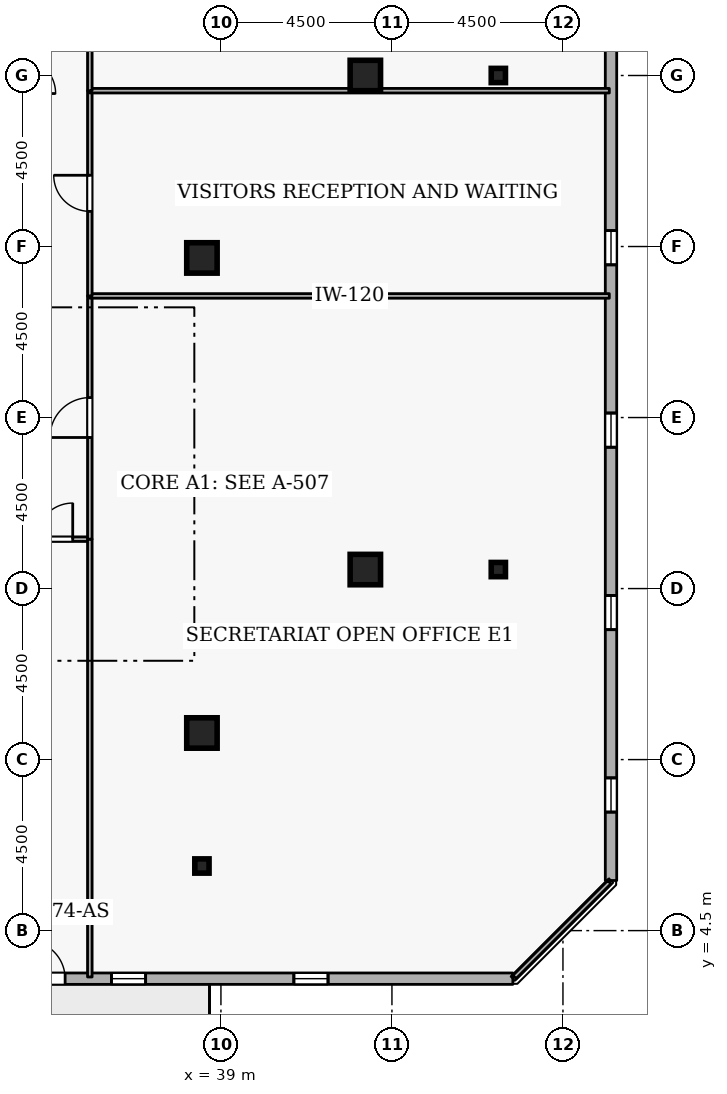
"""IFC4 building model, lengths in metres.
Left out: names, types, materials, properties, quantities, classifications, styles, units other than length and angle.
Written with IfcOpenShell. Run it as: python <this file> out.ifc"""

import sys

from ifc_helpers import new_model, si_unit, direction, frame, frame_2d, origin, origin_2d, place, context, subcontext, project, spatial, rectangle, i_section, extrude, element, fill, save


model = new_model("IFC4")
c1 = context("Model", 3, precision=1e-05, world=origin(), true_north=direction((0.0, 1.0)))
c2 = subcontext(c1, "Body", "Model", "MODEL_VIEW")
j1 = project(units=[si_unit("LENGTHUNIT", "METRE"), si_unit("PLANEANGLEUNIT", "RADIAN")], contexts=[c1])
p1 = place(None, origin())
s1 = spatial("IfcSite", under=j1, at=p1, CompositionType="ELEMENT")
p2 = place(p1, origin())
s2 = spatial("IfcBuilding", under=s1, at=p2, CompositionType="ELEMENT")
p3 = place(p2, frame((0.0, 0.0, 276.3)))
s3 = spatial("IfcBuildingStorey", under=s2, at=p3, CompositionType="ELEMENT", Elevation=276.3)
for number, where, z_axis, x_axis in (
    (1, (38.5, 9.7, 0.0), (0.0, 0.0, 1.0), (1.0, 0.0, 0.0)),
    (2, (42.8, 14.0, 0.0), (0.0, 0.0, 1.0), (1.0, 0.0, 0.0)),
    (3, (42.8, 27.0, 0.0), (0.0, 0.0, 1.0), (1.0, 0.0, 0.0)),
    (4, (38.5, 22.2, 0.0), (0.0, 0.0, 1.0), (1.0, 0.0, 0.0)),
):
    element("IfcColumn", number, at=place(p3, frame(where, z_axis=z_axis, x_axis=x_axis)), inside=s3, PredefinedType="COLUMN", context=c2, shape_type="SweptSolid", body=[
        extrude(rectangle(XDim=0.8, YDim=0.8, at=origin_2d()), origin(), (0.0, 0.0, 1.0), 3.6),
    ])
for number, where, z_axis, x_axis in (
    (5, (38.5, 6.2, 0.0), (0.0, 0.0, 1.0), (1.0, 0.0, 0.0)),
    (6, (46.3, 14.0, 0.0), (0.0, 0.0, 1.0), (1.0, 0.0, 0.0)),
    (7, (46.3, 27.0, 0.0), (0.0, 0.0, 1.0), (1.0, 0.0, 0.0)),
):
    element("IfcColumn", number, at=place(p3, frame(where, z_axis=z_axis, x_axis=x_axis)), inside=s3, PredefinedType="COLUMN", context=c2, shape_type="SweptSolid", body=[
        extrude(i_section(OverallWidth=0.375, OverallDepth=0.375, WebThickness=0.017, FlangeThickness=0.027, FilletRadius=0.015, at=origin_2d()), origin(), (0.0, 0.0, 1.0), 3.6),
    ])
p4 = place(p3, frame((10.319, 3.235, 0.0), z_axis=(0.0, 0.0, 1.0), x_axis=(1.0, 0.0, 0.0)))
e8 = element("IfcWall", 8, at=p4, inside=s3, PredefinedType="STANDARD", context=c2, shape_type="SweptSolid", body=[
    extrude(rectangle(XDim=36.363, YDim=0.3, at=frame_2d((18.181, 0.0))), origin(), (0.0, 0.0, 1.0), 2.66),
])
p5 = place(p4, frame((23.581, 0.0, 0.0)))
e9 = element("IfcOpeningElement", 9, at=p5, cuts=e8, PredefinedType="OPENING", context=c2, shape_type="SweptSolid", body=[
    extrude(rectangle(XDim=1.0, YDim=2.08, at=frame_2d((0.5, 1.04))), frame((0.0, 0.16, 0.0), z_axis=(0.0, -1.0, 0.0), x_axis=(1.0, 0.0, 0.0)), (0.0, 0.0, 1.0), 0.32),
])
p6 = place(p4, frame((1.8, 0.0, 0.72)))
e10 = element("IfcOpeningElement", 10, at=p6, cuts=e8, PredefinedType="OPENING", context=c2, shape_type="SweptSolid", body=[
    extrude(rectangle(XDim=0.9, YDim=1.75, at=frame_2d((0.45, 0.875))), frame((0.0, 0.16, 0.0), z_axis=(0.0, -1.0, 0.0), x_axis=(1.0, 0.0, 0.0)), (0.0, 0.0, 1.0), 0.32),
])
p7 = place(p4, frame((6.6, 0.0, 0.72)))
e11 = element("IfcOpeningElement", 11, at=p7, cuts=e8, PredefinedType="OPENING", context=c2, shape_type="SweptSolid", body=[
    extrude(rectangle(XDim=0.9, YDim=1.75, at=frame_2d((0.45, 0.875))), frame((0.0, 0.16, 0.0), z_axis=(0.0, -1.0, 0.0), x_axis=(1.0, 0.0, 0.0)), (0.0, 0.0, 1.0), 0.32),
])
p8 = place(p4, frame((11.4, 0.0, 0.72)))
e12 = element("IfcOpeningElement", 12, at=p8, cuts=e8, PredefinedType="OPENING", context=c2, shape_type="SweptSolid", body=[
    extrude(rectangle(XDim=0.9, YDim=1.75, at=frame_2d((0.45, 0.875))), frame((0.0, 0.16, 0.0), z_axis=(0.0, -1.0, 0.0), x_axis=(1.0, 0.0, 0.0)), (0.0, 0.0, 1.0), 0.32),
])
p9 = place(p4, frame((16.2, 0.0, 0.72)))
e13 = element("IfcOpeningElement", 13, at=p9, cuts=e8, PredefinedType="OPENING", context=c2, shape_type="SweptSolid", body=[
    extrude(rectangle(XDim=0.9, YDim=1.75, at=frame_2d((0.45, 0.875))), frame((0.0, 0.16, 0.0), z_axis=(0.0, -1.0, 0.0), x_axis=(1.0, 0.0, 0.0)), (0.0, 0.0, 1.0), 0.32),
])
p10 = place(p4, frame((21.0, 0.0, 0.72)))
e14 = element("IfcOpeningElement", 14, at=p10, cuts=e8, PredefinedType="OPENING", context=c2, shape_type="SweptSolid", body=[
    extrude(rectangle(XDim=0.9, YDim=1.75, at=frame_2d((0.45, 0.875))), frame((0.0, 0.16, 0.0), z_axis=(0.0, -1.0, 0.0), x_axis=(1.0, 0.0, 0.0)), (0.0, 0.0, 1.0), 0.32),
])
p11 = place(p4, frame((25.8, 0.0, 0.72)))
e15 = element("IfcOpeningElement", 15, at=p11, cuts=e8, PredefinedType="OPENING", context=c2, shape_type="SweptSolid", body=[
    extrude(rectangle(XDim=0.9, YDim=1.75, at=frame_2d((0.45, 0.875))), frame((0.0, 0.16, 0.0), z_axis=(0.0, -1.0, 0.0), x_axis=(1.0, 0.0, 0.0)), (0.0, 0.0, 1.0), 0.32),
])
p12 = place(p4, frame((30.6, 0.0, 0.72)))
e16 = element("IfcOpeningElement", 16, at=p12, cuts=e8, PredefinedType="OPENING", context=c2, shape_type="SweptSolid", body=[
    extrude(rectangle(XDim=0.9, YDim=1.75, at=frame_2d((0.45, 0.875))), frame((0.0, 0.16, 0.0), z_axis=(0.0, -1.0, 0.0), x_axis=(1.0, 0.0, 0.0)), (0.0, 0.0, 1.0), 0.32),
])
p13 = place(p3, frame((49.265, 5.819, 0.0), z_axis=(0.0, 0.0, 1.0), x_axis=(0.0, 1.0, 0.0)))
e17 = element("IfcWall", 17, at=p13, inside=s3, PredefinedType="STANDARD", context=c2, shape_type="SweptSolid", body=[
    extrude(rectangle(XDim=36.363, YDim=0.3, at=frame_2d((18.181, 0.0))), origin(), (0.0, 0.0, 1.0), 2.66),
])
p14 = place(p13, frame((1.8, 0.0, 0.72)))
e18 = element("IfcOpeningElement", 18, at=p14, cuts=e17, PredefinedType="OPENING", context=c2, shape_type="SweptSolid", body=[
    extrude(rectangle(XDim=0.9, YDim=1.75, at=frame_2d((0.45, 0.875))), frame((0.0, 0.16, 0.0), z_axis=(0.0, -1.0, 0.0), x_axis=(1.0, 0.0, 0.0)), (0.0, 0.0, 1.0), 0.32),
])
p15 = place(p13, frame((6.6, 0.0, 0.72)))
e19 = element("IfcOpeningElement", 19, at=p15, cuts=e17, PredefinedType="OPENING", context=c2, shape_type="SweptSolid", body=[
    extrude(rectangle(XDim=0.9, YDim=1.75, at=frame_2d((0.45, 0.875))), frame((0.0, 0.16, 0.0), z_axis=(0.0, -1.0, 0.0), x_axis=(1.0, 0.0, 0.0)), (0.0, 0.0, 1.0), 0.32),
])
p16 = place(p13, frame((11.4, 0.0, 0.72)))
e20 = element("IfcOpeningElement", 20, at=p16, cuts=e17, PredefinedType="OPENING", context=c2, shape_type="SweptSolid", body=[
    extrude(rectangle(XDim=0.9, YDim=1.75, at=frame_2d((0.45, 0.875))), frame((0.0, 0.16, 0.0), z_axis=(0.0, -1.0, 0.0), x_axis=(1.0, 0.0, 0.0)), (0.0, 0.0, 1.0), 0.32),
])
p17 = place(p13, frame((16.2, 0.0, 0.72)))
e21 = element("IfcOpeningElement", 21, at=p17, cuts=e17, PredefinedType="OPENING", context=c2, shape_type="SweptSolid", body=[
    extrude(rectangle(XDim=0.9, YDim=1.75, at=frame_2d((0.45, 0.875))), frame((0.0, 0.16, 0.0), z_axis=(0.0, -1.0, 0.0), x_axis=(1.0, 0.0, 0.0)), (0.0, 0.0, 1.0), 0.32),
])
p18 = place(p13, frame((30.6, 0.0, 0.72)))
e22 = element("IfcOpeningElement", 22, at=p18, cuts=e17, PredefinedType="OPENING", context=c2, shape_type="SweptSolid", body=[
    extrude(rectangle(XDim=0.9, YDim=1.75, at=frame_2d((0.45, 0.875))), frame((0.0, 0.16, 0.0), z_axis=(0.0, -1.0, 0.0), x_axis=(1.0, 0.0, 0.0)), (0.0, 0.0, 1.0), 0.32),
])
p19 = place(p3, frame((33.7, 14.8, 0.0), z_axis=(0.0, 0.0, 1.0), x_axis=(1.0, 0.0, 0.0)))
e23 = element("IfcWall", 23, at=p19, inside=s3, PredefinedType="PARTITIONING", context=c2, shape_type="SweptSolid", body=[
    extrude(rectangle(XDim=1.85, YDim=0.12, at=frame_2d((0.925, 0.0))), origin(), (0.0, 0.0, 1.0), 3.26),
])
p20 = place(p19, frame((0.45, 0.0, 0.0)))
e24 = element("IfcOpeningElement", 24, at=p20, cuts=e23, PredefinedType="OPENING", context=c2, shape_type="SweptSolid", body=[
    extrude(rectangle(XDim=0.95, YDim=2.1, at=frame_2d((0.475, 1.05))), frame((0.0, 0.07, 0.0), z_axis=(0.0, -1.0, 0.0), x_axis=(1.0, 0.0, 0.0)), (0.0, 0.0, 1.0), 0.14),
])
p21 = place(p3, frame((35.55, 14.8, 0.0), z_axis=(0.0, 0.0, 1.0), x_axis=(0.0, -1.0, 0.0)))
e25 = element("IfcWall", 25, at=p21, inside=s3, PredefinedType="PARTITIONING", context=c2, shape_type="SweptSolid", body=[
    extrude(rectangle(XDim=11.52, YDim=0.12, at=frame_2d((5.76, 0.0))), origin(), (0.0, 0.0, 1.0), 3.26),
])
p22 = place(p3, frame((35.55, 14.8, 0.0), z_axis=(0.0, 0.0, 1.0), x_axis=(0.0, 1.0, 0.0)))
e26 = element("IfcWall", 26, at=p22, inside=s3, PredefinedType="PARTITIONING", context=c2, shape_type="SweptSolid", body=[
    extrude(rectangle(XDim=6.4, YDim=0.12, at=frame_2d((3.2, 0.0))), origin(), (0.0, 0.0, 1.0), 3.26),
])
p23 = place(p22, frame((2.675, 0.0, 0.0)))
e27 = element("IfcOpeningElement", 27, at=p23, cuts=e26, PredefinedType="OPENING", context=c2, shape_type="SweptSolid", body=[
    extrude(rectangle(XDim=1.05, YDim=2.1, at=frame_2d((0.525, 1.05))), frame((0.0, 0.07, 0.0), z_axis=(0.0, -1.0, 0.0), x_axis=(1.0, 0.0, 0.0)), (0.0, 0.0, 1.0), 0.14),
])
p24 = place(p3, frame((35.55, 21.2, 0.0), z_axis=(0.0, 0.0, 1.0), x_axis=(1.0, 0.0, 0.0)))
e28 = element("IfcWall", 28, at=p24, inside=s3, PredefinedType="PARTITIONING", context=c2, shape_type="SweptSolid", body=[
    extrude(rectangle(XDim=13.67, YDim=0.12, at=frame_2d((6.835, 0.0))), origin(), (0.0, 0.0, 1.0), 3.26),
])
p25 = place(p3, frame((49.22, 5.775, 0.0), z_axis=(0.0, 0.0, 1.0), x_axis=(-0.707106781187, -0.707106781187, 0.0)))
e29 = element("IfcWall", 29, at=p25, inside=s3, PredefinedType="PARTITIONING", context=c2, shape_type="SweptSolid", body=[
    extrude(rectangle(XDim=3.528, YDim=0.12, at=frame_2d((1.764, 0.0))), origin(), (0.0, 0.0, 1.0), 3.26),
])
p26 = place(p3, frame((35.55, 21.2, 0.0), z_axis=(0.0, 0.0, 1.0), x_axis=(0.0, 1.0, 0.0)))
e30 = element("IfcWall", 30, at=p26, inside=s3, PredefinedType="PARTITIONING", context=c2, shape_type="SweptSolid", body=[
    extrude(rectangle(XDim=5.4, YDim=0.12, at=frame_2d((2.7, 0.0))), origin(), (0.0, 0.0, 1.0), 3.26),
])
p27 = place(p26, frame((2.225, 0.0, 0.0)))
e31 = element("IfcOpeningElement", 31, at=p27, cuts=e30, PredefinedType="OPENING", context=c2, shape_type="SweptSolid", body=[
    extrude(rectangle(XDim=0.95, YDim=2.1, at=frame_2d((0.475, 1.05))), frame((0.0, 0.07, 0.0), z_axis=(0.0, -1.0, 0.0), x_axis=(1.0, 0.0, 0.0)), (0.0, 0.0, 1.0), 0.14),
])
p28 = place(p3, frame((35.55, 26.6, 0.0), z_axis=(0.0, 0.0, 1.0), x_axis=(1.0, 0.0, 0.0)))
e32 = element("IfcWall", 32, at=p28, inside=s3, PredefinedType="PARTITIONING", context=c2, shape_type="SweptSolid", body=[
    extrude(rectangle(XDim=13.67, YDim=0.12, at=frame_2d((6.835, 0.0))), origin(), (0.0, 0.0, 1.0), 3.26),
])
p29 = place(p3, frame((35.55, 26.6, 0.0), z_axis=(0.0, 0.0, 1.0), x_axis=(0.0, 1.0, 0.0)))
e33 = element("IfcWall", 33, at=p29, inside=s3, PredefinedType="PARTITIONING", context=c2, shape_type="SweptSolid", body=[
    extrude(rectangle(XDim=4.8, YDim=0.12, at=frame_2d((2.4, 0.0))), origin(), (0.0, 0.0, 1.0), 3.26),
])
p30 = place(p29, frame((1.925, 0.0, 0.0)))
e34 = element("IfcOpeningElement", 34, at=p30, cuts=e33, PredefinedType="OPENING", context=c2, shape_type="SweptSolid", body=[
    extrude(rectangle(XDim=0.95, YDim=2.1, at=frame_2d((0.475, 1.05))), frame((0.0, 0.07, 0.0), z_axis=(0.0, -1.0, 0.0), x_axis=(1.0, 0.0, 0.0)), (0.0, 0.0, 1.0), 0.14),
])
p31 = place(p5, origin())
e35 = element("IfcDoor", 35, at=p31, inside=s3, OperationType="SINGLE_SWING_LEFT", PredefinedType="DOOR", context=c2, shape_type="SweptSolid", body=[
    extrude(rectangle(XDim=1.0, YDim=2.08, at=frame_2d((0.5, 1.04))), frame((0.0, 0.025, 0.0), z_axis=(0.0, -1.0, 0.0), x_axis=(1.0, 0.0, 0.0)), (0.0, 0.0, 1.0), 0.05),
])
fill(e9, e35)
p32 = place(p11, origin())
e36 = element("IfcWindow", 36, at=p32, inside=s3, PartitioningType="SINGLE_PANEL", PredefinedType="WINDOW", context=c2, shape_type="SweptSolid", body=[
    extrude(rectangle(XDim=0.9, YDim=1.75, at=frame_2d((0.45, 0.875))), frame((0.0, 0.03, 0.0), z_axis=(0.0, -1.0, 0.0), x_axis=(1.0, 0.0, 0.0)), (0.0, 0.0, 1.0), 0.06),
])
fill(e15, e36)
p33 = place(p12, origin())
e37 = element("IfcWindow", 37, at=p33, inside=s3, PartitioningType="SINGLE_PANEL", PredefinedType="WINDOW", context=c2, shape_type="SweptSolid", body=[
    extrude(rectangle(XDim=0.9, YDim=1.75, at=frame_2d((0.45, 0.875))), frame((0.0, 0.03, 0.0), z_axis=(0.0, -1.0, 0.0), x_axis=(1.0, 0.0, 0.0)), (0.0, 0.0, 1.0), 0.06),
])
fill(e16, e37)
p34 = place(p14, origin())
e38 = element("IfcWindow", 38, at=p34, inside=s3, PartitioningType="SINGLE_PANEL", PredefinedType="WINDOW", context=c2, shape_type="SweptSolid", body=[
    extrude(rectangle(XDim=0.9, YDim=1.75, at=frame_2d((0.45, 0.875))), frame((0.0, 0.03, 0.0), z_axis=(0.0, -1.0, 0.0), x_axis=(1.0, 0.0, 0.0)), (0.0, 0.0, 1.0), 0.06),
])
fill(e18, e38)
p35 = place(p15, origin())
e39 = element("IfcWindow", 39, at=p35, inside=s3, PartitioningType="SINGLE_PANEL", PredefinedType="WINDOW", context=c2, shape_type="SweptSolid", body=[
    extrude(rectangle(XDim=0.9, YDim=1.75, at=frame_2d((0.45, 0.875))), frame((0.0, 0.03, 0.0), z_axis=(0.0, -1.0, 0.0), x_axis=(1.0, 0.0, 0.0)), (0.0, 0.0, 1.0), 0.06),
])
fill(e19, e39)
p36 = place(p16, origin())
e40 = element("IfcWindow", 40, at=p36, inside=s3, PartitioningType="SINGLE_PANEL", PredefinedType="WINDOW", context=c2, shape_type="SweptSolid", body=[
    extrude(rectangle(XDim=0.9, YDim=1.75, at=frame_2d((0.45, 0.875))), frame((0.0, 0.03, 0.0), z_axis=(0.0, -1.0, 0.0), x_axis=(1.0, 0.0, 0.0)), (0.0, 0.0, 1.0), 0.06),
])
fill(e20, e40)
p37 = place(p17, origin())
e41 = element("IfcWindow", 41, at=p37, inside=s3, PartitioningType="SINGLE_PANEL", PredefinedType="WINDOW", context=c2, shape_type="SweptSolid", body=[
    extrude(rectangle(XDim=0.9, YDim=1.75, at=frame_2d((0.45, 0.875))), frame((0.0, 0.03, 0.0), z_axis=(0.0, -1.0, 0.0), x_axis=(1.0, 0.0, 0.0)), (0.0, 0.0, 1.0), 0.06),
])
fill(e21, e41)
p38 = place(p20, origin())
e42 = element("IfcDoor", 42, at=p38, inside=s3, OperationType="SINGLE_SWING_RIGHT", PredefinedType="DOOR", context=c2, shape_type="SweptSolid", body=[
    extrude(rectangle(XDim=0.95, YDim=2.1, at=frame_2d((0.475, 1.05))), frame((0.0, 0.025, 0.0), z_axis=(0.0, -1.0, 0.0), x_axis=(1.0, 0.0, 0.0)), (0.0, 0.0, 1.0), 0.05),
])
fill(e24, e42)
p39 = place(p23, origin())
e43 = element("IfcDoor", 43, at=p39, inside=s3, OperationType="SINGLE_SWING_LEFT", PredefinedType="DOOR", context=c2, shape_type="SweptSolid", body=[
    extrude(rectangle(XDim=1.05, YDim=2.1, at=frame_2d((0.525, 1.05))), frame((0.0, 0.025, 0.0), z_axis=(0.0, -1.0, 0.0), x_axis=(1.0, 0.0, 0.0)), (0.0, 0.0, 1.0), 0.05),
])
fill(e27, e43)
p40 = place(p27, origin())
e44 = element("IfcDoor", 44, at=p40, inside=s3, OperationType="SINGLE_SWING_RIGHT", PredefinedType="DOOR", context=c2, shape_type="SweptSolid", body=[
    extrude(rectangle(XDim=0.95, YDim=2.1, at=frame_2d((0.475, 1.05))), frame((0.0, 0.025, 0.0), z_axis=(0.0, -1.0, 0.0), x_axis=(1.0, 0.0, 0.0)), (0.0, 0.0, 1.0), 0.05),
])
fill(e31, e44)
save(model, sys.argv[1])
